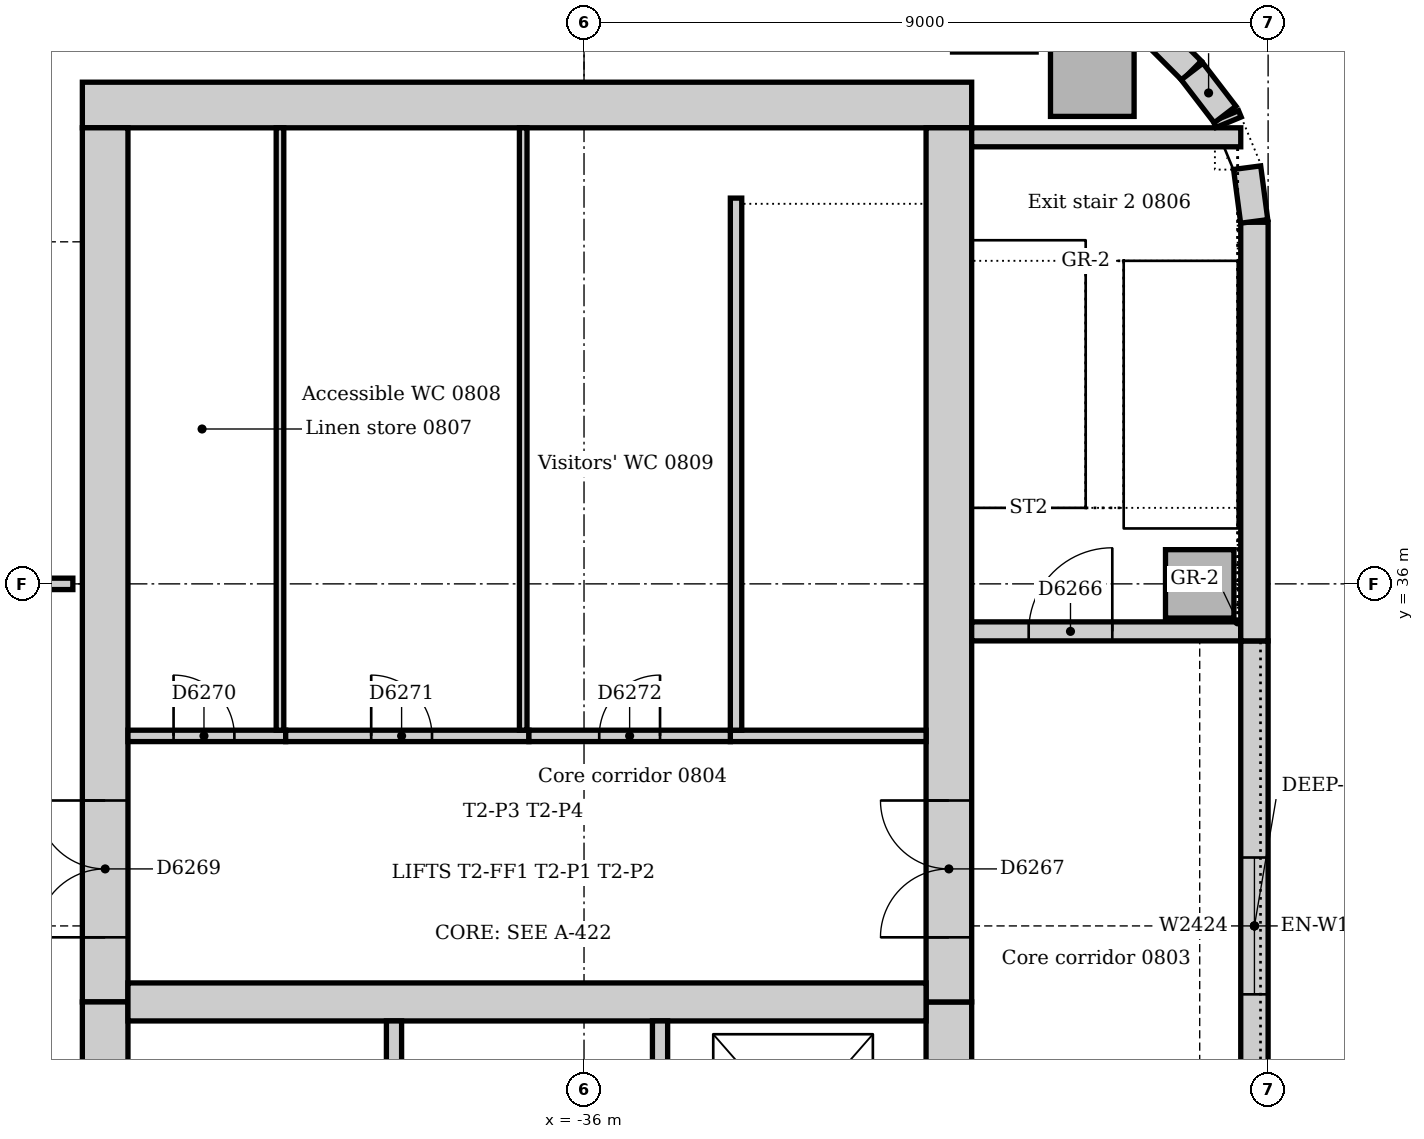
"""IFC4 building model, lengths in metres.
Left out: names, types, materials, properties, quantities, classifications, styles, units other than length and angle.
Written with IfcOpenShell. Run it as: python <this file> out.ifc"""

import sys

from ifc_helpers import new_model, si_unit, direction, frame, frame_2d, origin, origin_2d, place, context, subcontext, project, spatial, rectangle, extrude, element, fill, save


model = new_model("IFC4")
c1 = context("Model", 3, precision=1e-05, world=origin(), true_north=direction((0.0, 1.0)))
c2 = subcontext(c1, "Body", "Model", "MODEL_VIEW")
j1 = project(units=[si_unit("LENGTHUNIT", "METRE"), si_unit("PLANEANGLEUNIT", "RADIAN")], contexts=[c1])
p1 = place(None, origin())
s1 = spatial("IfcSite", under=j1, at=p1, CompositionType="ELEMENT")
p2 = place(p1, origin())
s2 = spatial("IfcBuilding", under=s1, at=p2, CompositionType="ELEMENT")
p3 = place(p2, frame((0.0, 0.0, 38.0)))
s3 = spatial("IfcBuildingStorey", under=s2, at=p3, CompositionType="ELEMENT", Elevation=38.0)
p4 = place(p3, frame((-30.9, 42.3, 0.0), z_axis=(0.0, 0.0, 1.0), x_axis=(-1.0, 0.0, 0.0)))
e1 = element("IfcWall", 1, at=p4, inside=s3, PredefinedType="SOLIDWALL", context=c2, shape_type="SweptSolid", body=[
    extrude(rectangle(XDim=11.7, YDim=0.6, at=frame_2d((5.85, 0.0))), origin(), (0.0, 0.0, 1.0), 4.0),
])
p5 = place(p3, frame((-31.2, 21.0, 0.0), z_axis=(0.0, 0.0, 1.0), x_axis=(0.0, 1.0, 0.0)))
e2 = element("IfcWall", 2, at=p5, inside=s3, PredefinedType="SOLIDWALL", context=c2, shape_type="SweptSolid", body=[
    extrude(rectangle(XDim=9.5, YDim=0.6, at=frame_2d((4.75, 0.0))), origin(), (0.0, 0.0, 1.0), 4.0),
])
p6 = place(p5, frame((5.25, 0.0, 0.0)))
e3 = element("IfcOpeningElement", 3, at=p6, cuts=e2, PredefinedType="OPENING", context=c2, shape_type="SweptSolid", body=[
    extrude(rectangle(XDim=1.0, YDim=2.1, at=frame_2d((0.5, 1.05))), frame((0.0, 0.31, 0.0), z_axis=(0.0, -1.0, 0.0), x_axis=(1.0, 0.0, 0.0)), (0.0, 0.0, 1.0), 0.62),
])
p7 = place(p3, frame((-31.2, 30.5, 0.0), z_axis=(0.0, 0.0, 1.0), x_axis=(0.0, 1.0, 0.0)))
e4 = element("IfcWall", 4, at=p7, inside=s3, PredefinedType="SOLIDWALL", context=c2, shape_type="SweptSolid", body=[
    extrude(rectangle(XDim=11.5, YDim=0.6, at=frame_2d((5.75, 0.0))), origin(), (0.0, 0.0, 1.0), 4.0),
])
p8 = place(p7, frame((0.85, 0.0, 0.0)))
e5 = element("IfcOpeningElement", 5, at=p8, cuts=e4, PredefinedType="OPENING", context=c2, shape_type="SweptSolid", body=[
    extrude(rectangle(XDim=1.8, YDim=2.1, at=frame_2d((0.9, 1.05))), frame((0.0, 0.31, 0.0), z_axis=(0.0, -1.0, 0.0), x_axis=(1.0, 0.0, 0.0)), (0.0, 0.0, 1.0), 0.62),
])
p9 = place(p3, frame((-42.3, 42.0, 0.0), z_axis=(0.0, 0.0, 1.0), x_axis=(0.0, -1.0, 0.0)))
e6 = element("IfcWall", 6, at=p9, inside=s3, PredefinedType="SOLIDWALL", context=c2, shape_type="SweptSolid", body=[
    extrude(rectangle(XDim=11.5, YDim=0.6, at=frame_2d((5.75, 0.0))), origin(), (0.0, 0.0, 1.0), 4.0),
])
p10 = place(p9, frame((8.85, 0.0, 0.0)))
e7 = element("IfcOpeningElement", 7, at=p10, cuts=e6, PredefinedType="OPENING", context=c2, shape_type="SweptSolid", body=[
    extrude(rectangle(XDim=1.8, YDim=2.1, at=frame_2d((0.9, 1.05))), frame((0.0, 0.31, 0.0), z_axis=(0.0, -1.0, 0.0), x_axis=(1.0, 0.0, 0.0)), (0.0, 0.0, 1.0), 0.62),
])
p11 = place(p3, frame((-42.3, 30.5, 0.0), z_axis=(0.0, 0.0, 1.0), x_axis=(0.0, -1.0, 0.0)))
e8 = element("IfcWall", 8, at=p11, inside=s3, PredefinedType="SOLIDWALL", context=c2, shape_type="SweptSolid", body=[
    extrude(rectangle(XDim=9.5, YDim=0.6, at=frame_2d((4.75, 0.0))), origin(), (0.0, 0.0, 1.0), 4.0),
])
p12 = place(p11, frame((3.85, 0.0, 0.0)))
e9 = element("IfcOpeningElement", 9, at=p12, cuts=e8, PredefinedType="OPENING", context=c2, shape_type="SweptSolid", body=[
    extrude(rectangle(XDim=1.8, YDim=2.1, at=frame_2d((0.9, 1.05))), frame((0.0, 0.31, 0.0), z_axis=(0.0, -1.0, 0.0), x_axis=(1.0, 0.0, 0.0)), (0.0, 0.0, 1.0), 0.62),
])
p13 = place(p3, frame((-42.0, 30.5, 0.0), z_axis=(0.0, 0.0, 1.0), x_axis=(1.0, 0.0, 0.0)))
e10 = element("IfcWall", 10, at=p13, inside=s3, PredefinedType="SOLIDWALL", context=c2, shape_type="SweptSolid", body=[
    extrude(rectangle(XDim=10.5, YDim=0.5, at=frame_2d((5.25, 0.0))), origin(), (0.0, 0.0, 1.0), 4.0),
])
p14 = place(p3, frame((-30.9, 35.375, 0.0), z_axis=(0.0, 0.0, 1.0), x_axis=(1.0, 0.0, 0.0)))
e11 = element("IfcWall", 11, at=p14, inside=s3, PredefinedType="SOLIDWALL", context=c2, shape_type="SweptSolid", body=[
    extrude(rectangle(XDim=3.54, YDim=0.25, at=frame_2d((1.77, 0.0))), origin(), (0.0, 0.0, 1.0), 4.0),
])
p15 = place(p14, frame((0.75, 0.0, 0.0)))
e12 = element("IfcOpeningElement", 12, at=p15, cuts=e11, PredefinedType="OPENING", context=c2, shape_type="SweptSolid", body=[
    extrude(rectangle(XDim=1.1, YDim=2.1, at=frame_2d((0.55, 1.05))), frame((0.0, 0.135, 0.0), z_axis=(0.0, -1.0, 0.0), x_axis=(1.0, 0.0, 0.0)), (0.0, 0.0, 1.0), 0.27),
])
p16 = place(p3, frame((-27.36, 41.875, 0.0), z_axis=(0.0, 0.0, 1.0), x_axis=(-1.0, 0.0, 0.0)))
e13 = element("IfcWall", 13, at=p16, inside=s3, PredefinedType="SOLIDWALL", context=c2, shape_type="SweptSolid", body=[
    extrude(rectangle(XDim=3.54, YDim=0.25, at=frame_2d((1.77, 0.0))), origin(), (0.0, 0.0, 1.0), 4.0),
])
for number, where, z_axis, x_axis in (
    (14, (-29.313, 42.7, 0.0), (0.0, 0.0, 1.0), (1.0, 0.0, 0.0)),
    (15, (-30.602, 43.547, 0.0), (0.0, 0.0, 1.0), (1.0, 0.0, 0.0)),
):
    element("IfcColumn", number, at=place(p3, frame(where, z_axis=z_axis, x_axis=x_axis)), inside=s3, PredefinedType="COLUMN", context=c2, shape_type="SweptSolid", body=[
        extrude(rectangle(XDim=1.1, YDim=1.1, at=origin_2d()), origin(), (0.0, 0.0, 1.0), 3.85),
    ])
p17 = place(p3, frame((-27.9, 36.0, 0.0), z_axis=(0.0, 0.0, 1.0), x_axis=(1.0, 0.0, 0.0)))
e16 = element("IfcColumn", 16, at=p17, inside=s3, PredefinedType="COLUMN", context=c2, shape_type="SweptSolid", body=[
    extrude(rectangle(XDim=0.9, YDim=0.9, at=origin_2d()), origin(), (0.0, 0.0, 1.0), 4.0),
])
p18 = place(p3, frame((-27.18, 27.75, 0.0), z_axis=(0.0, 0.0, 1.0), x_axis=(0.0, 1.0, 0.0)))
e17 = element("IfcWall", 17, at=p18, inside=s3, PredefinedType="STANDARD", context=c2, shape_type="SweptSolid", body=[
    extrude(rectangle(XDim=7.5, YDim=0.36, at=frame_2d((3.75, 0.0))), origin(), (0.0, 0.0, 1.0), 3.85),
])
p19 = place(p18, frame((2.85, 0.0, 1.2)))
e18 = element("IfcOpeningElement", 18, at=p19, cuts=e17, PredefinedType="OPENING", context=c2, shape_type="SweptSolid", body=[
    extrude(rectangle(XDim=1.8, YDim=1.2, at=frame_2d((0.9, 0.6))), frame((0.0, 0.19, 0.0), z_axis=(0.0, -1.0, 0.0), x_axis=(1.0, 0.0, 0.0)), (0.0, 0.0, 1.0), 0.38),
])
p20 = place(p3, frame((-27.18, 35.25, 0.0), z_axis=(0.0, 0.0, 1.0), x_axis=(0.0, 1.0, 0.0)))
e19 = element("IfcWall", 19, at=p20, inside=s3, PredefinedType="STANDARD", context=c2, shape_type="SweptSolid", body=[
    extrude(rectangle(XDim=5.507, YDim=0.36, at=frame_2d((2.754, 0.0))), origin(), (0.0, 0.0, 1.0), 3.85),
])
p21 = place(p3, frame((-28.006, 42.751, 0.0), z_axis=(0.0, 0.0, 1.0), x_axis=(-0.707106781187, 0.707106781187, 0.0)))
e20 = element("IfcWall", 20, at=p21, inside=s3, PredefinedType="STANDARD", context=c2, shape_type="SweptSolid", body=[
    extrude(rectangle(XDim=1.757, YDim=0.36, at=frame_2d((0.879, 0.0))), origin(), (0.0, 0.0, 1.0), 3.85),
])
p22 = place(p3, frame((-27.183, 40.769, 0.0), z_axis=(0.0, 0.0, 1.0), x_axis=(-0.13055608231, 0.99144092581, 0.0)))
e21 = element("IfcWall", 21, at=p22, inside=s3, PredefinedType="STANDARD", context=c2, shape_type="SweptSolid", body=[
    extrude(rectangle(XDim=0.713, YDim=0.36, at=frame_2d((0.356, 0.0))), origin(), (0.0, 0.0, 1.0), 3.85),
])
p23 = place(p3, frame((-27.521, 42.074, 0.0), z_axis=(0.0, 0.0, 1.0), x_axis=(-0.382549378284, 0.923935048136, 0.0)))
e22 = element("IfcWall", 22, at=p23, inside=s3, PredefinedType="STANDARD", context=c2, shape_type="SweptSolid", body=[
    extrude(rectangle(XDim=0.089, YDim=0.36, at=frame_2d((0.045, 0.0))), origin(), (0.0, 0.0, 1.0), 3.85),
])
p24 = place(p3, frame((-27.566, 42.175, 0.0), z_axis=(0.0, 0.0, 1.0), x_axis=(-0.608802368033, 0.793321924995, 0.0)))
e23 = element("IfcWall", 23, at=p24, inside=s3, PredefinedType="STANDARD", context=c2, shape_type="SweptSolid", body=[
    extrude(rectangle(XDim=0.713, YDim=0.36, at=frame_2d((0.357, 0.0))), origin(), (0.0, 0.0, 1.0), 3.85),
])
for number, where, z_axis, x_axis in (
    (24, (-38.5, 27.4, 0.0), (0.0, 0.0, 1.0), (0.0, 1.0, 0.0)),
    (25, (-35.0, 27.4, 0.0), (0.0, 0.0, 1.0), (0.0, 1.0, 0.0)),
):
    element("IfcWall", number, at=place(p3, frame(where, z_axis=z_axis, x_axis=x_axis)), inside=s3, PredefinedType="SOLIDWALL", context=c2, shape_type="SweptSolid", body=[
        extrude(rectangle(XDim=2.85, YDim=0.2, at=frame_2d((1.425, 0.0))), origin(), (0.0, 0.0, 1.0), 4.0),
    ])
p25 = place(p3, frame((-34.075, 34.0, 0.0), z_axis=(0.0, 0.0, 1.0), x_axis=(1.0, 0.0, 0.0)))
e26 = element("IfcWall", 26, at=p25, inside=s3, PredefinedType="SOLIDWALL", context=c2, shape_type="SweptSolid", body=[
    extrude(rectangle(XDim=2.575, YDim=0.15, at=frame_2d((1.288, 0.0))), origin(), (0.0, 0.0, 1.0), 4.0),
])
p26 = place(p3, frame((-34.0, 41.075, 0.0), z_axis=(0.0, 0.0, 1.0), x_axis=(0.0, -1.0, 0.0)))
e27 = element("IfcWall", 27, at=p26, inside=s3, PredefinedType="SOLIDWALL", context=c2, shape_type="SweptSolid", body=[
    extrude(rectangle(XDim=7.0, YDim=0.15, at=frame_2d((3.5, 0.0))), origin(), (0.0, 0.0, 1.0), 4.0),
])
p27 = place(p3, frame((-39.925, 34.0, 0.0), z_axis=(0.0, 0.0, 1.0), x_axis=(-1.0, 0.0, 0.0)))
e28 = element("IfcWall", 28, at=p27, inside=s3, PredefinedType="PARTITIONING", context=c2, shape_type="SweptSolid", body=[
    extrude(rectangle(XDim=2.075, YDim=0.15, at=frame_2d((1.038, 0.0))), origin(), (0.0, 0.0, 1.0), 3.85),
])
p28 = place(p27, frame((0.675, 0.0, 0.0)))
e29 = element("IfcOpeningElement", 29, at=p28, cuts=e28, PredefinedType="OPENING", context=c2, shape_type="SweptSolid", body=[
    extrude(rectangle(XDim=0.8, YDim=2.1, at=frame_2d((0.4, 1.05))), frame((0.0, 0.085, 0.0), z_axis=(0.0, -1.0, 0.0), x_axis=(1.0, 0.0, 0.0)), (0.0, 0.0, 1.0), 0.17),
])
p29 = place(p3, frame((-36.725, 34.0, 0.0), z_axis=(0.0, 0.0, 1.0), x_axis=(-1.0, 0.0, 0.0)))
e30 = element("IfcWall", 30, at=p29, inside=s3, PredefinedType="PARTITIONING", context=c2, shape_type="SweptSolid", body=[
    extrude(rectangle(XDim=3.2, YDim=0.15, at=frame_2d((1.6, 0.0))), origin(), (0.0, 0.0, 1.0), 3.85),
])
p30 = place(p29, frame((1.275, 0.0, 0.0)))
e31 = element("IfcOpeningElement", 31, at=p30, cuts=e30, PredefinedType="OPENING", context=c2, shape_type="SweptSolid", body=[
    extrude(rectangle(XDim=0.8, YDim=2.1, at=frame_2d((0.4, 1.05))), frame((0.0, 0.085, 0.0), z_axis=(0.0, -1.0, 0.0), x_axis=(1.0, 0.0, 0.0)), (0.0, 0.0, 1.0), 0.17),
])
p31 = place(p3, frame((-34.075, 34.0, 0.0), z_axis=(0.0, 0.0, 1.0), x_axis=(-1.0, 0.0, 0.0)))
e32 = element("IfcWall", 32, at=p31, inside=s3, PredefinedType="PARTITIONING", context=c2, shape_type="SweptSolid", body=[
    extrude(rectangle(XDim=2.65, YDim=0.15, at=frame_2d((1.325, 0.0))), origin(), (0.0, 0.0, 1.0), 3.85),
])
p32 = place(p31, frame((0.925, 0.0, 0.0)))
e33 = element("IfcOpeningElement", 33, at=p32, cuts=e32, PredefinedType="OPENING", context=c2, shape_type="SweptSolid", body=[
    extrude(rectangle(XDim=0.8, YDim=2.1, at=frame_2d((0.4, 1.05))), frame((0.0, 0.085, 0.0), z_axis=(0.0, -1.0, 0.0), x_axis=(1.0, 0.0, 0.0)), (0.0, 0.0, 1.0), 0.17),
])
for number, where, z_axis, x_axis in (
    (34, (-40.0, 34.075, 0.0), (0.0, 0.0, 1.0), (0.0, 1.0, 0.0)),
    (35, (-36.8, 34.075, 0.0), (0.0, 0.0, 1.0), (0.0, 1.0, 0.0)),
):
    element("IfcWall", number, at=place(p3, frame(where, z_axis=z_axis, x_axis=x_axis)), inside=s3, PredefinedType="PARTITIONING", context=c2, shape_type="SweptSolid", body=[
        extrude(rectangle(XDim=7.925, YDim=0.1, at=frame_2d((3.962, 0.0))), origin(), (0.0, 0.0, 1.0), 3.85),
    ])
p33 = place(p3, frame((-44.6, 36.0, 0.0), z_axis=(0.0, 0.0, 1.0), x_axis=(1.0, 0.0, 0.0)))
e36 = element("IfcWall", 36, at=p33, inside=s3, PredefinedType="PARTITIONING", context=c2, shape_type="SweptSolid", body=[
    extrude(rectangle(XDim=1.875, YDim=0.15, at=frame_2d((0.938, 0.0))), origin(), (0.0, 0.0, 1.0), 3.602),
])
p34 = place(p33, frame((0.5, 0.0, 0.0)))
e37 = element("IfcOpeningElement", 37, at=p34, cuts=e36, PredefinedType="OPENING", context=c2, shape_type="SweptSolid", body=[
    extrude(rectangle(XDim=0.9, YDim=2.1, at=frame_2d((0.45, 1.05))), frame((0.0, 0.085, 0.0), z_axis=(0.0, -1.0, 0.0), x_axis=(1.0, 0.0, 0.0)), (0.0, 0.0, 1.0), 0.17),
])
p35 = place(p19, origin())
e38 = element("IfcWindow", 38, at=p35, inside=s3, PartitioningType="SINGLE_PANEL", PredefinedType="WINDOW", context=c2, shape_type="SweptSolid", body=[
    extrude(rectangle(XDim=1.8, YDim=1.2, at=frame_2d((0.9, 0.6))), frame((0.0, 0.13, 0.0), z_axis=(0.0, -1.0, 0.0), x_axis=(1.0, 0.0, 0.0)), (0.0, 0.0, 1.0), 0.06),
])
fill(e18, e38)
p36 = place(p15, origin())
e39 = element("IfcDoor", 39, at=p36, inside=s3, OperationType="SINGLE_SWING_RIGHT", PredefinedType="DOOR", context=c2, shape_type="SweptSolid", body=[
    extrude(rectangle(XDim=1.1, YDim=2.1, at=frame_2d((0.55, 1.05))), frame((0.0, 0.025, 0.0), z_axis=(0.0, -1.0, 0.0), x_axis=(1.0, 0.0, 0.0)), (0.0, 0.0, 1.0), 0.05),
])
fill(e12, e39)
p37 = place(p8, origin())
e40 = element("IfcDoor", 40, at=p37, inside=s3, OperationType="DOUBLE_DOOR_SINGLE_SWING", PredefinedType="DOOR", context=c2, shape_type="SweptSolid", body=[
    extrude(rectangle(XDim=1.8, YDim=2.1, at=frame_2d((0.9, 1.05))), frame((0.0, 0.025, 0.0), z_axis=(0.0, -1.0, 0.0), x_axis=(1.0, 0.0, 0.0)), (0.0, 0.0, 1.0), 0.05),
])
fill(e5, e40)
p38 = place(p10, frame((1.8, 0.0, 0.0), z_axis=(0.0, 0.0, 1.0), x_axis=(-1.0, 0.0, 0.0)))
e41 = element("IfcDoor", 41, at=p38, inside=s3, OperationType="DOUBLE_DOOR_SINGLE_SWING", PredefinedType="DOOR", context=c2, shape_type="SweptSolid", body=[
    extrude(rectangle(XDim=1.8, YDim=2.1, at=frame_2d((0.9, 1.05))), frame((0.0, 0.025, 0.0), z_axis=(0.0, -1.0, 0.0), x_axis=(1.0, 0.0, 0.0)), (0.0, 0.0, 1.0), 0.05),
])
fill(e7, e41)
p39 = place(p28, frame((0.8, 0.0, 0.0), z_axis=(0.0, 0.0, 1.0), x_axis=(-1.0, 0.0, 0.0)))
e42 = element("IfcDoor", 42, at=p39, inside=s3, OperationType="SINGLE_SWING_LEFT", PredefinedType="DOOR", context=c2, shape_type="SweptSolid", body=[
    extrude(rectangle(XDim=0.8, YDim=2.1, at=frame_2d((0.4, 1.05))), frame((0.0, 0.025, 0.0), z_axis=(0.0, -1.0, 0.0), x_axis=(1.0, 0.0, 0.0)), (0.0, 0.0, 1.0), 0.05),
])
fill(e29, e42)
p40 = place(p30, frame((0.8, 0.0, 0.0), z_axis=(0.0, 0.0, 1.0), x_axis=(-1.0, 0.0, 0.0)))
e43 = element("IfcDoor", 43, at=p40, inside=s3, OperationType="SINGLE_SWING_LEFT", PredefinedType="DOOR", context=c2, shape_type="SweptSolid", body=[
    extrude(rectangle(XDim=0.8, YDim=2.1, at=frame_2d((0.4, 1.05))), frame((0.0, 0.025, 0.0), z_axis=(0.0, -1.0, 0.0), x_axis=(1.0, 0.0, 0.0)), (0.0, 0.0, 1.0), 0.05),
])
fill(e31, e43)
p41 = place(p32, frame((0.8, 0.0, 0.0), z_axis=(0.0, 0.0, 1.0), x_axis=(-1.0, 0.0, 0.0)))
e44 = element("IfcDoor", 44, at=p41, inside=s3, OperationType="SINGLE_SWING_RIGHT", PredefinedType="DOOR", context=c2, shape_type="SweptSolid", body=[
    extrude(rectangle(XDim=0.8, YDim=2.1, at=frame_2d((0.4, 1.05))), frame((0.0, 0.025, 0.0), z_axis=(0.0, -1.0, 0.0), x_axis=(1.0, 0.0, 0.0)), (0.0, 0.0, 1.0), 0.05),
])
fill(e33, e44)
save(model, sys.argv[1])
